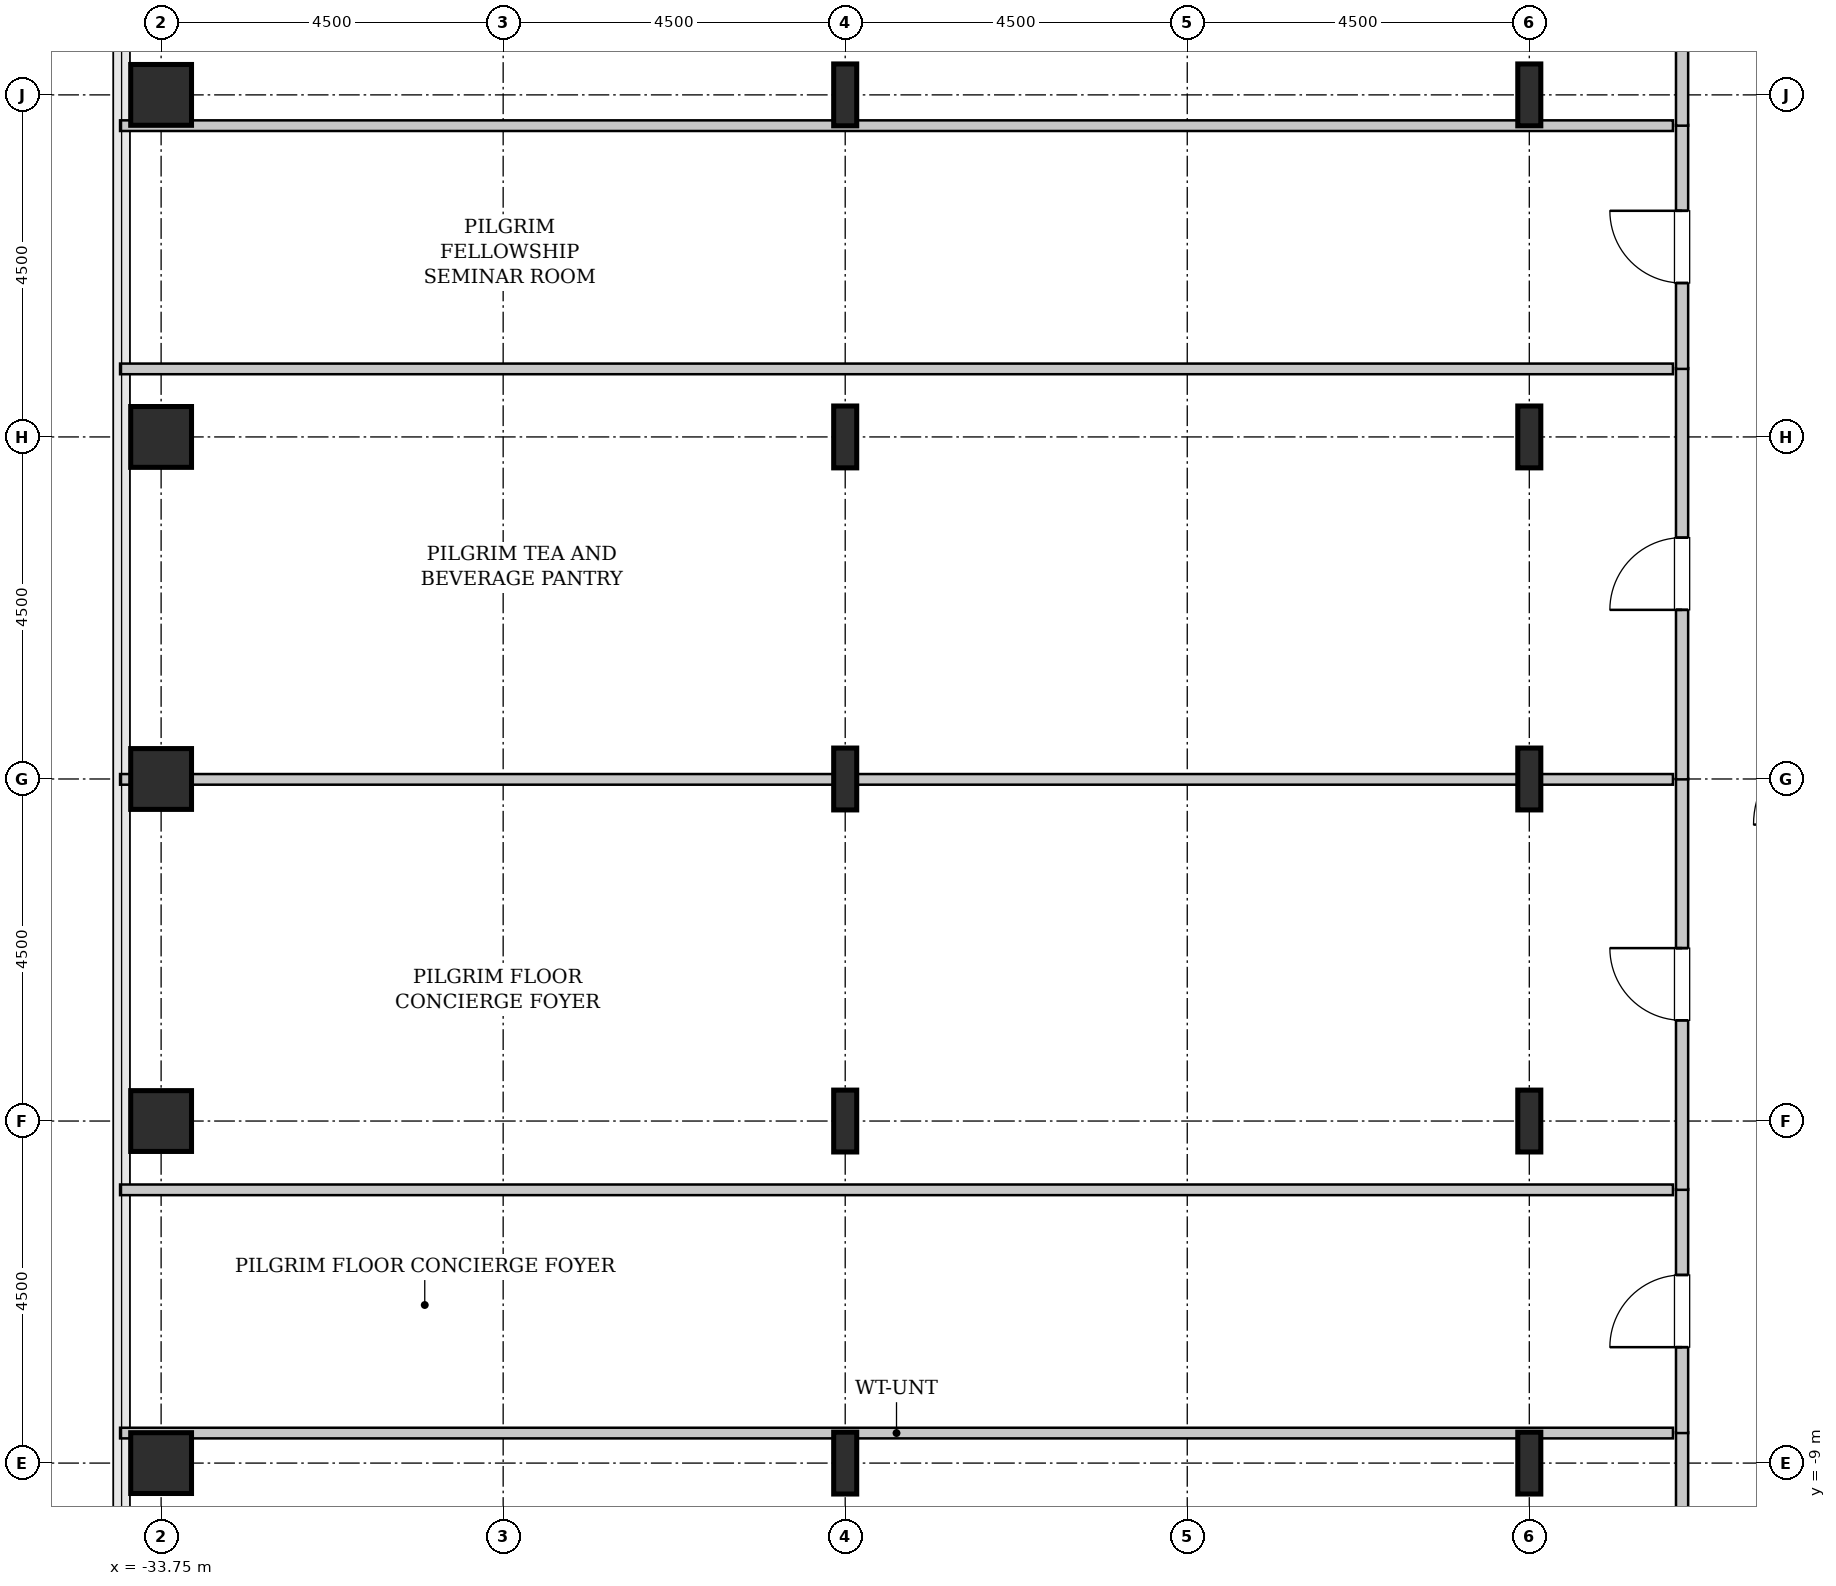
"""IFC4 building model, lengths in metres.
Left out: names, types, materials, properties, quantities, classifications, styles, units other than length and angle.
Written with IfcOpenShell. Run it as: python <this file> out.ifc"""

import sys

from ifc_helpers import new_model, si_unit, direction, frame, frame_2d, origin, origin_2d, place, context, subcontext, project, spatial, rectangle, hollow_rectangle, i_section, extrude, source, transform, mapped, element, fill, save


model = new_model("IFC4")
c1 = context("Model", 3, precision=1e-05, world=origin(), true_north=direction((0.0, 1.0)))
c2 = subcontext(c1, "Body", "Model", "MODEL_VIEW")
j1 = project(units=[si_unit("LENGTHUNIT", "METRE"), si_unit("PLANEANGLEUNIT", "RADIAN")], contexts=[c1])
p1 = place(None, origin())
s1 = spatial("IfcSite", under=j1, at=p1, CompositionType="ELEMENT")
p2 = place(p1, origin())
s2 = spatial("IfcBuilding", under=s1, at=p2, CompositionType="ELEMENT")
p3 = place(p2, frame((0.0, 0.0, 186.8)))
s3 = spatial("IfcBuildingStorey", under=s2, at=p3, CompositionType="ELEMENT", Elevation=186.8)
m1 = source(origin(), c2, "Body", "SweptSolid", [
    extrude(hollow_rectangle(XDim=0.8, YDim=0.8, WallThickness=0.04, InnerFilletRadius=0.04, OuterFilletRadius=0.08, at=origin_2d()), origin(), (0.0, 0.0, 1.0), 3.8),
])
for number, where, z_axis, x_axis in (
    (1, (-33.75, -9.0, 0.0), (0.0, 0.0, 1.0), (1.0, 0.0, 0.0)),
    (2, (-33.75, -4.5, 0.0), (0.0, 0.0, 1.0), (1.0, 0.0, 0.0)),
    (3, (-33.75, 0.0, 0.0), (0.0, 0.0, 1.0), (1.0, 0.0, 0.0)),
    (4, (-33.75, 4.5, 0.0), (0.0, 0.0, 1.0), (1.0, 0.0, 0.0)),
    (5, (-33.75, 9.0, 0.0), (0.0, 0.0, 1.0), (1.0, 0.0, 0.0)),
):
    element("IfcColumn", number, at=place(p3, frame(where, z_axis=z_axis, x_axis=x_axis)), inside=s3, PredefinedType="COLUMN", context=c2, shape_type="MappedRepresentation", body=[
        mapped(m1, transform((0.0, 0.0, 0.0), x_axis=(1.0, 0.0, 0.0), y_axis=(0.0, 1.0, 0.0), z_axis=(0.0, 0.0, 1.0), scale=1.0)),
    ])
m2 = source(origin(), c2, "Body", "SweptSolid", [
    extrude(i_section(OverallWidth=0.303, OverallDepth=0.814, WebThickness=0.021, FlangeThickness=0.04, FilletRadius=0.03, at=origin_2d()), origin(), (0.0, 0.0, 1.0), 3.8),
])
for number, where, z_axis, x_axis in (
    (6, (-24.75, -9.0, 0.0), (0.0, 0.0, 1.0), (1.0, 0.0, 0.0)),
    (7, (-24.75, -4.5, 0.0), (0.0, 0.0, 1.0), (1.0, 0.0, 0.0)),
    (8, (-24.75, 0.0, 0.0), (0.0, 0.0, 1.0), (1.0, 0.0, 0.0)),
    (9, (-24.75, 4.5, 0.0), (0.0, 0.0, 1.0), (1.0, 0.0, 0.0)),
    (10, (-24.75, 9.0, 0.0), (0.0, 0.0, 1.0), (1.0, 0.0, 0.0)),
    (11, (-15.75, -9.0, 0.0), (0.0, 0.0, 1.0), (1.0, 0.0, 0.0)),
    (12, (-15.75, -4.5, 0.0), (0.0, 0.0, 1.0), (1.0, 0.0, 0.0)),
    (13, (-15.75, 0.0, 0.0), (0.0, 0.0, 1.0), (1.0, 0.0, 0.0)),
    (14, (-15.75, 4.5, 0.0), (0.0, 0.0, 1.0), (1.0, 0.0, 0.0)),
    (15, (-15.75, 9.0, 0.0), (0.0, 0.0, 1.0), (1.0, 0.0, 0.0)),
):
    element("IfcColumn", number, at=place(p3, frame(where, z_axis=z_axis, x_axis=x_axis)), inside=s3, PredefinedType="COLUMN", context=c2, shape_type="MappedRepresentation", body=[
        mapped(m2, transform((0.0, 0.0, 0.0), x_axis=(1.0, 0.0, 0.0), y_axis=(0.0, 1.0, 0.0), z_axis=(0.0, 0.0, 1.0), scale=1.0)),
    ])
m3 = source(origin(), c2, "Body", "SweptSolid", [
    extrude(rectangle(XDim=12.645, YDim=0.16, at=frame_2d((6.323, 0.0))), origin(), (0.0, 0.0, 1.0), 3.535),
])
p4 = place(p3, frame((-13.74, -21.24, 0.0), z_axis=(0.0, 0.0, 1.0), x_axis=(0.0, 1.0, 0.0)))
e16 = element("IfcWall", 16, at=p4, inside=s3, PredefinedType="PARTITIONING", context=c2, shape_type="MappedRepresentation", body=[
    mapped(m3, transform((0.0, 0.0, 0.0), x_axis=(1.0, 0.0, 0.0), y_axis=(0.0, 1.0, 0.0), z_axis=(0.0, 0.0, 1.0), scale=1.0)),
])
p5 = place(p4, frame((7.762, 0.0, 0.0)))
e17 = element("IfcOpeningElement", 17, at=p5, cuts=e16, PredefinedType="OPENING", context=c2, shape_type="SweptSolid", body=[
    extrude(rectangle(XDim=0.95, YDim=2.1, at=frame_2d((0.475, 1.05))), frame((0.0, 0.09, 0.0), z_axis=(0.0, -1.0, 0.0), x_axis=(1.0, 0.0, 0.0)), (0.0, 0.0, 1.0), 0.18),
])
m4 = source(origin(), c2, "Body", "SweptSolid", [
    extrude(rectangle(XDim=20.43, YDim=0.14, at=frame_2d((10.215, 0.0))), origin(), (0.0, 0.0, 1.0), 2.875),
])
p6 = place(p3, frame((-34.29, -8.605, 0.0), z_axis=(0.0, 0.0, 1.0), x_axis=(1.0, 0.0, 0.0)))
e18 = element("IfcWall", 18, at=p6, inside=s3, PredefinedType="PARTITIONING", context=c2, shape_type="MappedRepresentation", body=[
    mapped(m4, transform((0.0, 0.0, 0.0), x_axis=(1.0, 0.0, 0.0), y_axis=(0.0, 1.0, 0.0), z_axis=(0.0, 0.0, 1.0), scale=1.0)),
])
m5 = source(origin(), c2, "Body", "SweptSolid", [
    extrude(rectangle(XDim=3.21, YDim=0.16, at=frame_2d((1.605, 0.0))), origin(), (0.0, 0.0, 1.0), 3.535),
])
p7 = place(p3, frame((-13.74, -8.605, 0.0), z_axis=(0.0, 0.0, 1.0), x_axis=(0.0, 1.0, 0.0)))
e19 = element("IfcWall", 19, at=p7, inside=s3, PredefinedType="PARTITIONING", context=c2, shape_type="MappedRepresentation", body=[
    mapped(m5, transform((0.0, 0.0, 0.0), x_axis=(1.0, 0.0, 0.0), y_axis=(0.0, 1.0, 0.0), z_axis=(0.0, 0.0, 1.0), scale=1.0)),
])
p8 = place(p7, frame((1.13, 0.0, 0.0)))
e20 = element("IfcOpeningElement", 20, at=p8, cuts=e19, PredefinedType="OPENING", context=c2, shape_type="SweptSolid", body=[
    extrude(rectangle(XDim=0.95, YDim=2.1, at=frame_2d((0.475, 1.05))), frame((0.0, 0.09, 0.0), z_axis=(0.0, -1.0, 0.0), x_axis=(1.0, 0.0, 0.0)), (0.0, 0.0, 1.0), 0.18),
])
m6 = source(origin(), c2, "Body", "SweptSolid", [
    extrude(rectangle(XDim=20.43, YDim=0.14, at=frame_2d((10.215, 0.0))), origin(), (0.0, 0.0, 1.0), 3.535),
])
p9 = place(p3, frame((-34.29, -5.405, 0.0), z_axis=(0.0, 0.0, 1.0), x_axis=(1.0, 0.0, 0.0)))
e21 = element("IfcWall", 21, at=p9, inside=s3, PredefinedType="PARTITIONING", context=c2, shape_type="MappedRepresentation", body=[
    mapped(m6, transform((0.0, 0.0, 0.0), x_axis=(1.0, 0.0, 0.0), y_axis=(0.0, 1.0, 0.0), z_axis=(0.0, 0.0, 1.0), scale=1.0)),
])
m7 = source(origin(), c2, "Body", "SweptSolid", [
    extrude(rectangle(XDim=5.41, YDim=0.16, at=frame_2d((2.705, 0.0))), origin(), (0.0, 0.0, 1.0), 3.535),
])
p10 = place(p3, frame((-13.74, -5.405, 0.0), z_axis=(0.0, 0.0, 1.0), x_axis=(0.0, 1.0, 0.0)))
e22 = element("IfcWall", 22, at=p10, inside=s3, PredefinedType="PARTITIONING", context=c2, shape_type="MappedRepresentation", body=[
    mapped(m7, transform((0.0, 0.0, 0.0), x_axis=(1.0, 0.0, 0.0), y_axis=(0.0, 1.0, 0.0), z_axis=(0.0, 0.0, 1.0), scale=1.0)),
])
p11 = place(p10, frame((2.23, 0.0, 0.0)))
e23 = element("IfcOpeningElement", 23, at=p11, cuts=e22, PredefinedType="OPENING", context=c2, shape_type="SweptSolid", body=[
    extrude(rectangle(XDim=0.95, YDim=2.1, at=frame_2d((0.475, 1.05))), frame((0.0, 0.09, 0.0), z_axis=(0.0, -1.0, 0.0), x_axis=(1.0, 0.0, 0.0)), (0.0, 0.0, 1.0), 0.18),
])
p12 = place(p3, frame((-34.29, -0.005, 0.0), z_axis=(0.0, 0.0, 1.0), x_axis=(1.0, 0.0, 0.0)))
e24 = element("IfcWall", 24, at=p12, inside=s3, PredefinedType="PARTITIONING", context=c2, shape_type="MappedRepresentation", body=[
    mapped(m4, transform((0.0, 0.0, 0.0), x_axis=(1.0, 0.0, 0.0), y_axis=(0.0, 1.0, 0.0), z_axis=(0.0, 0.0, 1.0), scale=1.0)),
])
p13 = place(p3, frame((-13.74, -0.005, 0.0), z_axis=(0.0, 0.0, 1.0), x_axis=(0.0, 1.0, 0.0)))
e25 = element("IfcWall", 25, at=p13, inside=s3, PredefinedType="PARTITIONING", context=c2, shape_type="MappedRepresentation", body=[
    mapped(m7, transform((0.0, 0.0, 0.0), x_axis=(1.0, 0.0, 0.0), y_axis=(0.0, 1.0, 0.0), z_axis=(0.0, 0.0, 1.0), scale=1.0)),
])
p14 = place(p13, frame((2.23, 0.0, 0.0)))
e26 = element("IfcOpeningElement", 26, at=p14, cuts=e25, PredefinedType="OPENING", context=c2, shape_type="SweptSolid", body=[
    extrude(rectangle(XDim=0.95, YDim=2.1, at=frame_2d((0.475, 1.05))), frame((0.0, 0.09, 0.0), z_axis=(0.0, -1.0, 0.0), x_axis=(1.0, 0.0, 0.0)), (0.0, 0.0, 1.0), 0.18),
])
p15 = place(p3, frame((-34.29, 5.395, 0.0), z_axis=(0.0, 0.0, 1.0), x_axis=(1.0, 0.0, 0.0)))
e27 = element("IfcWall", 27, at=p15, inside=s3, PredefinedType="PARTITIONING", context=c2, shape_type="MappedRepresentation", body=[
    mapped(m6, transform((0.0, 0.0, 0.0), x_axis=(1.0, 0.0, 0.0), y_axis=(0.0, 1.0, 0.0), z_axis=(0.0, 0.0, 1.0), scale=1.0)),
])
p16 = place(p3, frame((-13.74, 5.395, 0.0), z_axis=(0.0, 0.0, 1.0), x_axis=(0.0, 1.0, 0.0)))
e28 = element("IfcWall", 28, at=p16, inside=s3, PredefinedType="PARTITIONING", context=c2, shape_type="MappedRepresentation", body=[
    mapped(m5, transform((0.0, 0.0, 0.0), x_axis=(1.0, 0.0, 0.0), y_axis=(0.0, 1.0, 0.0), z_axis=(0.0, 0.0, 1.0), scale=1.0)),
])
p17 = place(p16, frame((1.13, 0.0, 0.0)))
e29 = element("IfcOpeningElement", 29, at=p17, cuts=e28, PredefinedType="OPENING", context=c2, shape_type="SweptSolid", body=[
    extrude(rectangle(XDim=0.95, YDim=2.1, at=frame_2d((0.475, 1.05))), frame((0.0, 0.09, 0.0), z_axis=(0.0, -1.0, 0.0), x_axis=(1.0, 0.0, 0.0)), (0.0, 0.0, 1.0), 0.18),
])
p18 = place(p3, frame((-34.29, 8.595, 0.0), z_axis=(0.0, 0.0, 1.0), x_axis=(1.0, 0.0, 0.0)))
e30 = element("IfcWall", 30, at=p18, inside=s3, PredefinedType="PARTITIONING", context=c2, shape_type="MappedRepresentation", body=[
    mapped(m4, transform((0.0, 0.0, 0.0), x_axis=(1.0, 0.0, 0.0), y_axis=(0.0, 1.0, 0.0), z_axis=(0.0, 0.0, 1.0), scale=1.0)),
])
p19 = place(p3, frame((-13.74, 8.595, 0.0), z_axis=(0.0, 0.0, 1.0), x_axis=(0.0, 1.0, 0.0)))
e31 = element("IfcWall", 31, at=p19, inside=s3, PredefinedType="PARTITIONING", context=c2, shape_type="MappedRepresentation", body=[
    mapped(m3, transform((0.0, 0.0, 0.0), x_axis=(1.0, 0.0, 0.0), y_axis=(0.0, 1.0, 0.0), z_axis=(0.0, 0.0, 1.0), scale=1.0)),
])
p20 = place(p19, frame((3.933, 0.0, 0.0)))
e32 = element("IfcOpeningElement", 32, at=p20, cuts=e31, PredefinedType="OPENING", context=c2, shape_type="SweptSolid", body=[
    extrude(rectangle(XDim=0.95, YDim=2.1, at=frame_2d((0.475, 1.05))), frame((0.0, 0.09, 0.0), z_axis=(0.0, -1.0, 0.0), x_axis=(1.0, 0.0, 0.0)), (0.0, 0.0, 1.0), 0.18),
])
m8 = source(origin(), c2, "Body", "SweptSolid", [
    extrude(rectangle(XDim=0.95, YDim=2.1, at=frame_2d((0.475, 1.05))), frame((0.0, 0.025, 0.0), z_axis=(0.0, -1.0, 0.0), x_axis=(1.0, 0.0, 0.0)), (0.0, 0.0, 1.0), 0.05),
])
p21 = place(p8, origin())
e33 = element("IfcDoor", 33, at=p21, inside=s3, OperationType="SINGLE_SWING_LEFT", PredefinedType="DOOR", context=c2, shape_type="MappedRepresentation", body=[
    mapped(m8, transform((0.0, 0.0, 0.0), x_axis=(1.0, 0.0, 0.0), y_axis=(0.0, 1.0, 0.0), z_axis=(0.0, 0.0, 1.0), scale=1.0)),
])
fill(e20, e33)
p22 = place(p11, origin())
e34 = element("IfcDoor", 34, at=p22, inside=s3, OperationType="SINGLE_SWING_RIGHT", PredefinedType="DOOR", context=c2, shape_type="MappedRepresentation", body=[
    mapped(m8, transform((0.0, 0.0, 0.0), x_axis=(1.0, 0.0, 0.0), y_axis=(0.0, 1.0, 0.0), z_axis=(0.0, 0.0, 1.0), scale=1.0)),
])
fill(e23, e34)
p23 = place(p14, origin())
e35 = element("IfcDoor", 35, at=p23, inside=s3, OperationType="SINGLE_SWING_LEFT", PredefinedType="DOOR", context=c2, shape_type="MappedRepresentation", body=[
    mapped(m8, transform((0.0, 0.0, 0.0), x_axis=(1.0, 0.0, 0.0), y_axis=(0.0, 1.0, 0.0), z_axis=(0.0, 0.0, 1.0), scale=1.0)),
])
fill(e26, e35)
p24 = place(p17, origin())
e36 = element("IfcDoor", 36, at=p24, inside=s3, OperationType="SINGLE_SWING_RIGHT", PredefinedType="DOOR", context=c2, shape_type="MappedRepresentation", body=[
    mapped(m8, transform((0.0, 0.0, 0.0), x_axis=(1.0, 0.0, 0.0), y_axis=(0.0, 1.0, 0.0), z_axis=(0.0, 0.0, 1.0), scale=1.0)),
])
fill(e29, e36)
save(model, sys.argv[1])
